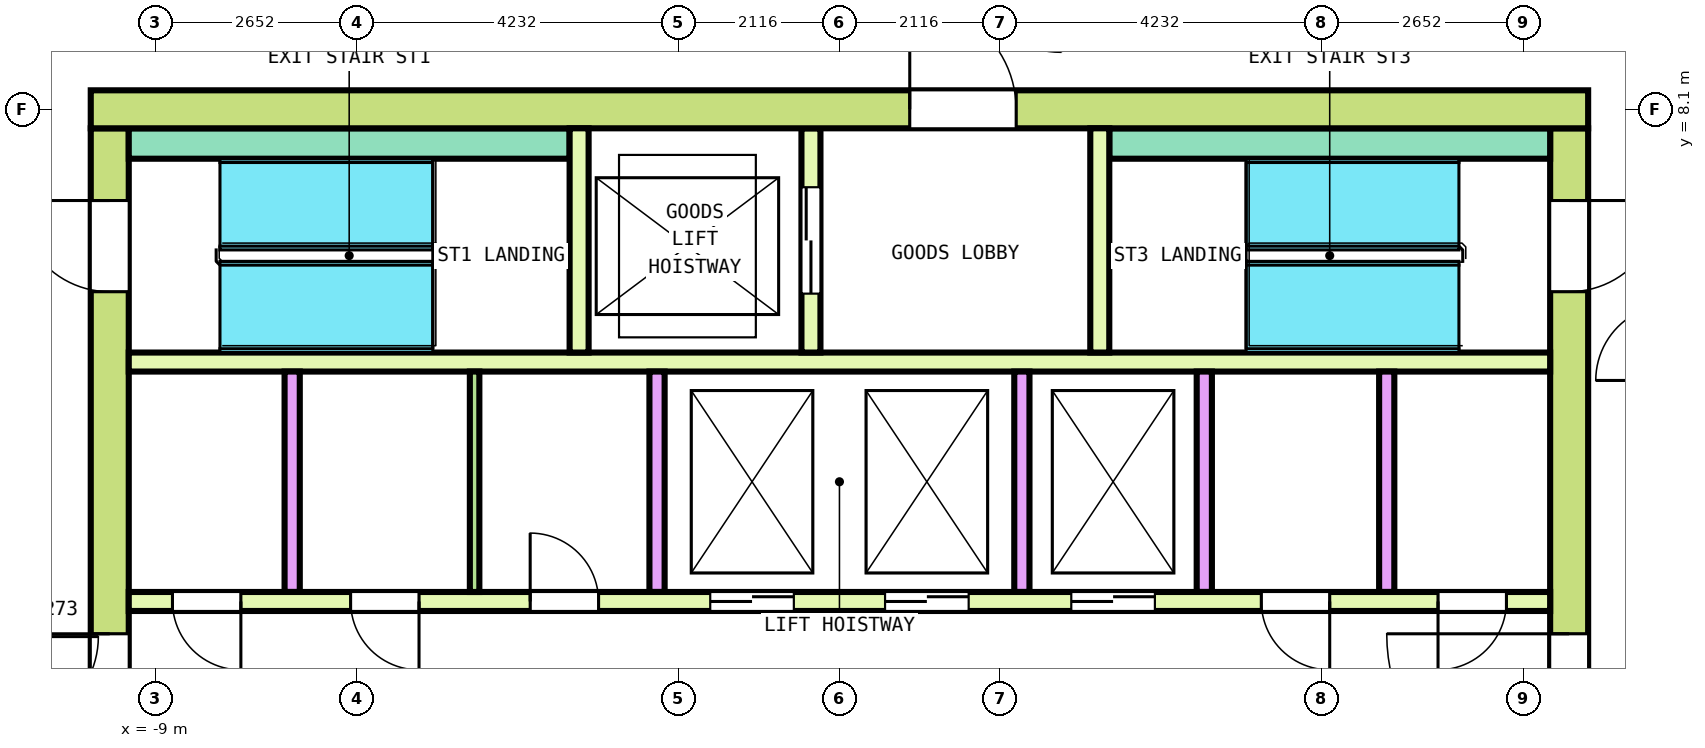
"""IFC4 building model, lengths in metres.
Left out: names, types, materials, properties, quantities, classifications, styles, units other than length and angle.
Written with IfcOpenShell. Run it as: python <this file> out.ifc"""

import sys

from ifc_helpers import new_model, si_unit, direction, frame, frame_2d, origin, place, context, subcontext, project, spatial, rectangle, extrude, element, fill, save


model = new_model("IFC4")
c1 = context("Model", 3, precision=1e-05, world=origin(), true_north=direction((0.0, 1.0)))
c2 = subcontext(c1, "Body", "Model", "MODEL_VIEW")
j1 = project(units=[si_unit("LENGTHUNIT", "METRE"), si_unit("PLANEANGLEUNIT", "RADIAN")], contexts=[c1])
p1 = place(None, origin())
s1 = spatial("IfcSite", under=j1, at=p1, CompositionType="ELEMENT")
p2 = place(p1, origin())
s2 = spatial("IfcBuilding", under=s1, at=p2, CompositionType="ELEMENT")
p3 = place(p2, frame((0.0, 0.0, 299.0)))
s3 = spatial("IfcBuildingStorey", under=s2, at=p3, CompositionType="ELEMENT", Elevation=299.0)
p4 = place(p3, frame((-9.85, 8.1, 0.0), z_axis=(0.0, 0.0, 1.0), x_axis=(1.0, 0.0, 0.0)))
e1 = element("IfcWall", 1, at=p4, inside=s3, PredefinedType="SHEAR", context=c2, shape_type="SweptSolid", body=[
    extrude(rectangle(XDim=19.7, YDim=0.5, at=frame_2d((9.85, 0.0))), origin(), (0.0, 0.0, 1.0), 3.7),
])
p5 = place(p4, frame((10.775, 0.0, 0.0)))
e2 = element("IfcOpeningElement", 2, at=p5, cuts=e1, PredefinedType="OPENING", context=c2, shape_type="SweptSolid", body=[
    extrude(rectangle(XDim=1.4, YDim=2.1, at=frame_2d((0.7, 1.05))), frame((0.0, 0.26, 0.0), z_axis=(0.0, -1.0, 0.0), x_axis=(1.0, 0.0, 0.0)), (0.0, 0.0, 1.0), 0.52),
])
p6 = place(p3, frame((-9.6, -7.85, 0.0), z_axis=(0.0, 0.0, 1.0), x_axis=(0.0, 1.0, 0.0)))
e3 = element("IfcWall", 3, at=p6, inside=s3, PredefinedType="SHEAR", context=c2, shape_type="SweptSolid", body=[
    extrude(rectangle(XDim=15.7, YDim=0.5, at=frame_2d((7.85, 0.0))), origin(), (0.0, 0.0, 1.0), 3.7),
])
p7 = place(p6, frame((6.65, 0.0, 0.0)))
e4 = element("IfcOpeningElement", 4, at=p7, cuts=e3, PredefinedType="OPENING", context=c2, shape_type="SweptSolid", body=[
    extrude(rectangle(XDim=2.4, YDim=2.1, at=frame_2d((1.2, 1.05))), frame((0.0, 0.26, 0.0), z_axis=(0.0, -1.0, 0.0), x_axis=(1.0, 0.0, 0.0)), (0.0, 0.0, 1.0), 0.52),
])
p8 = place(p6, frame((13.55, 0.0, 0.0)))
e5 = element("IfcOpeningElement", 5, at=p8, cuts=e3, PredefinedType="OPENING", context=c2, shape_type="SweptSolid", body=[
    extrude(rectangle(XDim=1.2, YDim=2.1, at=frame_2d((0.6, 1.05))), frame((0.0, 0.26, 0.0), z_axis=(0.0, -1.0, 0.0), x_axis=(1.0, 0.0, 0.0)), (0.0, 0.0, 1.0), 0.52),
])
p9 = place(p6, frame((0.95, 0.0, 0.0)))
e6 = element("IfcOpeningElement", 6, at=p9, cuts=e3, PredefinedType="OPENING", context=c2, shape_type="SweptSolid", body=[
    extrude(rectangle(XDim=1.2, YDim=2.1, at=frame_2d((0.6, 1.05))), frame((0.0, 0.26, 0.0), z_axis=(0.0, -1.0, 0.0), x_axis=(1.0, 0.0, 0.0)), (0.0, 0.0, 1.0), 0.52),
])
p10 = place(p3, frame((9.6, -7.85, 0.0), z_axis=(0.0, 0.0, 1.0), x_axis=(0.0, 1.0, 0.0)))
e7 = element("IfcWall", 7, at=p10, inside=s3, PredefinedType="SHEAR", context=c2, shape_type="SweptSolid", body=[
    extrude(rectangle(XDim=15.7, YDim=0.5, at=frame_2d((7.85, 0.0))), origin(), (0.0, 0.0, 1.0), 3.7),
])
p11 = place(p10, frame((6.65, 0.0, 0.0)))
e8 = element("IfcOpeningElement", 8, at=p11, cuts=e7, PredefinedType="OPENING", context=c2, shape_type="SweptSolid", body=[
    extrude(rectangle(XDim=2.4, YDim=2.1, at=frame_2d((1.2, 1.05))), frame((0.0, 0.26, 0.0), z_axis=(0.0, -1.0, 0.0), x_axis=(1.0, 0.0, 0.0)), (0.0, 0.0, 1.0), 0.52),
])
p12 = place(p10, frame((13.55, 0.0, 0.0)))
e9 = element("IfcOpeningElement", 9, at=p12, cuts=e7, PredefinedType="OPENING", context=c2, shape_type="SweptSolid", body=[
    extrude(rectangle(XDim=1.2, YDim=2.1, at=frame_2d((0.6, 1.05))), frame((0.0, 0.26, 0.0), z_axis=(0.0, -1.0, 0.0), x_axis=(1.0, 0.0, 0.0)), (0.0, 0.0, 1.0), 0.52),
])
p13 = place(p10, frame((1.05, 0.0, 0.0)))
e10 = element("IfcOpeningElement", 10, at=p13, cuts=e7, PredefinedType="OPENING", context=c2, shape_type="SweptSolid", body=[
    extrude(rectangle(XDim=1.0, YDim=2.1, at=frame_2d((0.5, 1.05))), frame((0.0, 0.26, 0.0), z_axis=(0.0, -1.0, 0.0), x_axis=(1.0, 0.0, 0.0)), (0.0, 0.0, 1.0), 0.52),
])
p14 = place(p3, frame((-9.35, 1.625, 0.0), z_axis=(0.0, 0.0, 1.0), x_axis=(1.0, 0.0, 0.0)))
e11 = element("IfcWall", 11, at=p14, inside=s3, PredefinedType="SOLIDWALL", context=c2, shape_type="SweptSolid", body=[
    extrude(rectangle(XDim=18.7, YDim=0.25, at=frame_2d((9.35, 0.0))), origin(), (0.0, 0.0, 1.0), 3.7),
])
p15 = place(p14, frame((7.65, 0.0, 0.0)))
e12 = element("IfcOpeningElement", 12, at=p15, cuts=e11, PredefinedType="OPENING", context=c2, shape_type="SweptSolid", body=[
    extrude(rectangle(XDim=1.1, YDim=2.1, at=frame_2d((0.55, 1.05))), frame((0.0, 0.135, 0.0), z_axis=(0.0, -1.0, 0.0), x_axis=(1.0, 0.0, 0.0)), (0.0, 0.0, 1.0), 0.27),
])
p16 = place(p14, frame((9.95, 0.0, 0.0)))
e13 = element("IfcOpeningElement", 13, at=p16, cuts=e11, PredefinedType="OPENING", context=c2, shape_type="SweptSolid", body=[
    extrude(rectangle(XDim=1.1, YDim=2.1, at=frame_2d((0.55, 1.05))), frame((0.0, 0.135, 0.0), z_axis=(0.0, -1.0, 0.0), x_axis=(1.0, 0.0, 0.0)), (0.0, 0.0, 1.0), 0.27),
])
p17 = place(p14, frame((12.4, 0.0, 0.0)))
e14 = element("IfcOpeningElement", 14, at=p17, cuts=e11, PredefinedType="OPENING", context=c2, shape_type="SweptSolid", body=[
    extrude(rectangle(XDim=1.1, YDim=2.1, at=frame_2d((0.55, 1.05))), frame((0.0, 0.135, 0.0), z_axis=(0.0, -1.0, 0.0), x_axis=(1.0, 0.0, 0.0)), (0.0, 0.0, 1.0), 0.27),
])
p18 = place(p14, frame((0.575, 0.0, 0.0)))
e15 = element("IfcOpeningElement", 15, at=p18, cuts=e11, PredefinedType="OPENING", context=c2, shape_type="SweptSolid", body=[
    extrude(rectangle(XDim=0.9, YDim=2.1, at=frame_2d((0.45, 1.05))), frame((0.0, 0.135, 0.0), z_axis=(0.0, -1.0, 0.0), x_axis=(1.0, 0.0, 0.0)), (0.0, 0.0, 1.0), 0.27),
])
p19 = place(p14, frame((2.919, 0.0, 0.0)))
e16 = element("IfcOpeningElement", 16, at=p19, cuts=e11, PredefinedType="OPENING", context=c2, shape_type="SweptSolid", body=[
    extrude(rectangle(XDim=0.9, YDim=2.1, at=frame_2d((0.45, 1.05))), frame((0.0, 0.135, 0.0), z_axis=(0.0, -1.0, 0.0), x_axis=(1.0, 0.0, 0.0)), (0.0, 0.0, 1.0), 0.27),
])
p20 = place(p14, frame((5.281, 0.0, 0.0)))
e17 = element("IfcOpeningElement", 17, at=p20, cuts=e11, PredefinedType="OPENING", context=c2, shape_type="SweptSolid", body=[
    extrude(rectangle(XDim=0.9, YDim=2.1, at=frame_2d((0.45, 1.05))), frame((0.0, 0.135, 0.0), z_axis=(0.0, -1.0, 0.0), x_axis=(1.0, 0.0, 0.0)), (0.0, 0.0, 1.0), 0.27),
])
p21 = place(p14, frame((14.9, 0.0, 0.0)))
e18 = element("IfcOpeningElement", 18, at=p21, cuts=e11, PredefinedType="OPENING", context=c2, shape_type="SweptSolid", body=[
    extrude(rectangle(XDim=0.9, YDim=2.1, at=frame_2d((0.45, 1.05))), frame((0.0, 0.135, 0.0), z_axis=(0.0, -1.0, 0.0), x_axis=(1.0, 0.0, 0.0)), (0.0, 0.0, 1.0), 0.27),
])
p22 = place(p14, frame((17.225, 0.0, 0.0)))
e19 = element("IfcOpeningElement", 19, at=p22, cuts=e11, PredefinedType="OPENING", context=c2, shape_type="SweptSolid", body=[
    extrude(rectangle(XDim=0.9, YDim=2.1, at=frame_2d((0.45, 1.05))), frame((0.0, 0.135, 0.0), z_axis=(0.0, -1.0, 0.0), x_axis=(1.0, 0.0, 0.0)), (0.0, 0.0, 1.0), 0.27),
])
p23 = place(p3, frame((-9.35, 4.775, 0.0), z_axis=(0.0, 0.0, 1.0), x_axis=(1.0, 0.0, 0.0)))
e20 = element("IfcWall", 20, at=p23, inside=s3, PredefinedType="SOLIDWALL", context=c2, shape_type="SweptSolid", body=[
    extrude(rectangle(XDim=18.7, YDim=0.25, at=frame_2d((9.35, 0.0))), origin(), (0.0, 0.0, 1.0), 3.7),
])
for number, where, z_axis, x_axis in (
    (21, (-7.2, 1.75, 0.0), (0.0, 0.0, 1.0), (0.0, 1.0, 0.0)),
    (22, (-2.4, 1.75, 0.0), (0.0, 0.0, 1.0), (0.0, 1.0, 0.0)),
    (23, (2.4, 1.75, 0.0), (0.0, 0.0, 1.0), (0.0, 1.0, 0.0)),
    (24, (4.8, 1.75, 0.0), (0.0, 0.0, 1.0), (0.0, 1.0, 0.0)),
    (25, (7.2, 1.75, 0.0), (0.0, 0.0, 1.0), (0.0, 1.0, 0.0)),
):
    element("IfcWall", number, at=place(p3, frame(where, z_axis=z_axis, x_axis=x_axis)), inside=s3, PredefinedType="SOLIDWALL", context=c2, shape_type="SweptSolid", body=[
        extrude(rectangle(XDim=2.9, YDim=0.2, at=frame_2d((1.45, 0.0))), origin(), (0.0, 0.0, 1.0), 3.7),
    ])
for number, where, z_axis, x_axis in (
    (26, (-9.35, 7.65, 0.0), (0.0, 0.0, 1.0), (1.0, 0.0, 0.0)),
    (27, (3.55, 7.65, 0.0), (0.0, 0.0, 1.0), (1.0, 0.0, 0.0)),
):
    element("IfcWall", number, at=place(p3, frame(where, z_axis=z_axis, x_axis=x_axis)), inside=s3, PredefinedType="SOLIDWALL", context=c2, shape_type="SweptSolid", body=[
        extrude(rectangle(XDim=5.8, YDim=0.4, at=frame_2d((2.9, 0.0))), origin(), (0.0, 0.0, 1.0), 3.7),
    ])
p24 = place(p3, frame((-3.425, 4.9, 0.0), z_axis=(0.0, 0.0, 1.0), x_axis=(0.0, 1.0, 0.0)))
e28 = element("IfcWall", 28, at=p24, inside=s3, PredefinedType="SOLIDWALL", context=c2, shape_type="SweptSolid", body=[
    extrude(rectangle(XDim=2.95, YDim=0.25, at=frame_2d((1.475, 0.0))), origin(), (0.0, 0.0, 1.0), 3.7),
])
p25 = place(p3, frame((-0.375, 4.9, 0.0), z_axis=(0.0, 0.0, 1.0), x_axis=(0.0, 1.0, 0.0)))
e29 = element("IfcWall", 29, at=p25, inside=s3, PredefinedType="SOLIDWALL", context=c2, shape_type="SweptSolid", body=[
    extrude(rectangle(XDim=2.95, YDim=0.25, at=frame_2d((1.475, 0.0))), origin(), (0.0, 0.0, 1.0), 3.7),
])
p26 = place(p25, frame((0.775, 0.0, 0.0)))
e30 = element("IfcOpeningElement", 30, at=p26, cuts=e29, PredefinedType="OPENING", context=c2, shape_type="SweptSolid", body=[
    extrude(rectangle(XDim=1.4, YDim=2.1, at=frame_2d((0.7, 1.05))), frame((0.0, 0.135, 0.0), z_axis=(0.0, -1.0, 0.0), x_axis=(1.0, 0.0, 0.0)), (0.0, 0.0, 1.0), 0.27),
])
p27 = place(p3, frame((3.425, 4.9, 0.0), z_axis=(0.0, 0.0, 1.0), x_axis=(0.0, 1.0, 0.0)))
e31 = element("IfcWall", 31, at=p27, inside=s3, PredefinedType="SOLIDWALL", context=c2, shape_type="SweptSolid", body=[
    extrude(rectangle(XDim=2.95, YDim=0.25, at=frame_2d((1.475, 0.0))), origin(), (0.0, 0.0, 1.0), 3.7),
])
p28 = place(p3, frame((-4.8, 1.75, 0.0), z_axis=(0.0, 0.0, 1.0), x_axis=(0.0, 1.0, 0.0)))
e32 = element("IfcWall", 32, at=p28, inside=s3, PredefinedType="PARTITIONING", context=c2, shape_type="SweptSolid", body=[
    extrude(rectangle(XDim=2.9, YDim=0.125, at=frame_2d((1.45, 0.0))), origin(), (0.0, 0.0, 1.0), 3.7),
])
p29 = place(p15, origin())
e33 = element("IfcDoor", 33, at=p29, inside=s3, OperationType="DOUBLE_DOOR_SLIDING", PredefinedType="DOOR", context=c2, shape_type="SweptSolid", body=[
    extrude(rectangle(XDim=1.1, YDim=2.1, at=frame_2d((0.55, 1.05))), frame((0.0, 0.075, 0.0), z_axis=(0.0, -1.0, 0.0), x_axis=(1.0, 0.0, 0.0)), (0.0, 0.0, 1.0), 0.15),
])
fill(e12, e33)
p30 = place(p16, origin())
e34 = element("IfcDoor", 34, at=p30, inside=s3, OperationType="DOUBLE_DOOR_SLIDING", PredefinedType="DOOR", context=c2, shape_type="SweptSolid", body=[
    extrude(rectangle(XDim=1.1, YDim=2.1, at=frame_2d((0.55, 1.05))), frame((0.0, 0.075, 0.0), z_axis=(0.0, -1.0, 0.0), x_axis=(1.0, 0.0, 0.0)), (0.0, 0.0, 1.0), 0.15),
])
fill(e13, e34)
p31 = place(p17, origin())
e35 = element("IfcDoor", 35, at=p31, inside=s3, OperationType="DOUBLE_DOOR_SLIDING", PredefinedType="DOOR", context=c2, shape_type="SweptSolid", body=[
    extrude(rectangle(XDim=1.1, YDim=2.1, at=frame_2d((0.55, 1.05))), frame((0.0, 0.075, 0.0), z_axis=(0.0, -1.0, 0.0), x_axis=(1.0, 0.0, 0.0)), (0.0, 0.0, 1.0), 0.15),
])
fill(e14, e35)
p32 = place(p26, origin())
e36 = element("IfcDoor", 36, at=p32, inside=s3, OperationType="DOUBLE_DOOR_SLIDING", PredefinedType="DOOR", context=c2, shape_type="SweptSolid", body=[
    extrude(rectangle(XDim=1.4, YDim=2.1, at=frame_2d((0.7, 1.05))), frame((0.0, 0.075, 0.0), z_axis=(0.0, -1.0, 0.0), x_axis=(1.0, 0.0, 0.0)), (0.0, 0.0, 1.0), 0.15),
])
fill(e30, e36)
p33 = place(p7, origin())
e37 = element("IfcDoor", 37, at=p33, inside=s3, OperationType="DOUBLE_DOOR_SINGLE_SWING", PredefinedType="DOOR", context=c2, shape_type="SweptSolid", body=[
    extrude(rectangle(XDim=2.4, YDim=2.1, at=frame_2d((1.2, 1.05))), frame((0.0, 0.2, 0.0), z_axis=(0.0, -1.0, 0.0), x_axis=(1.0, 0.0, 0.0)), (0.0, 0.0, 1.0), 0.4),
])
fill(e4, e37)
p34 = place(p11, origin())
e38 = element("IfcDoor", 38, at=p34, inside=s3, OperationType="DOUBLE_DOOR_SINGLE_SWING", PredefinedType="DOOR", context=c2, shape_type="SweptSolid", body=[
    extrude(rectangle(XDim=2.4, YDim=2.1, at=frame_2d((1.2, 1.05))), frame((0.0, 0.2, 0.0), z_axis=(0.0, -1.0, 0.0), x_axis=(1.0, 0.0, 0.0)), (0.0, 0.0, 1.0), 0.4),
])
fill(e8, e38)
p35 = place(p8, origin())
e39 = element("IfcDoor", 39, at=p35, inside=s3, OperationType="SINGLE_SWING_LEFT", PredefinedType="DOOR", context=c2, shape_type="SweptSolid", body=[
    extrude(rectangle(XDim=1.2, YDim=2.1, at=frame_2d((0.6, 1.05))), frame((0.0, 0.2, 0.0), z_axis=(0.0, -1.0, 0.0), x_axis=(1.0, 0.0, 0.0)), (0.0, 0.0, 1.0), 0.4),
])
fill(e5, e39)
p36 = place(p12, origin())
e40 = element("IfcDoor", 40, at=p36, inside=s3, OperationType="SINGLE_SWING_LEFT", PredefinedType="DOOR", context=c2, shape_type="SweptSolid", body=[
    extrude(rectangle(XDim=1.2, YDim=2.1, at=frame_2d((0.6, 1.05))), frame((0.0, 0.2, 0.0), z_axis=(0.0, -1.0, 0.0), x_axis=(1.0, 0.0, 0.0)), (0.0, 0.0, 1.0), 0.4),
])
fill(e9, e40)
p37 = place(p5, origin())
e41 = element("IfcDoor", 41, at=p37, inside=s3, OperationType="DOUBLE_DOOR_SINGLE_SWING", PredefinedType="DOOR", context=c2, shape_type="SweptSolid", body=[
    extrude(rectangle(XDim=1.4, YDim=2.1, at=frame_2d((0.7, 1.05))), frame((0.0, 0.2, 0.0), z_axis=(0.0, -1.0, 0.0), x_axis=(1.0, 0.0, 0.0)), (0.0, 0.0, 1.0), 0.4),
])
fill(e2, e41)
p38 = place(p18, origin())
e42 = element("IfcDoor", 42, at=p38, inside=s3, OperationType="SINGLE_SWING_LEFT", PredefinedType="DOOR", context=c2, shape_type="SweptSolid", body=[
    extrude(rectangle(XDim=0.9, YDim=2.1, at=frame_2d((0.45, 1.05))), frame((0.0, 0.075, 0.0), z_axis=(0.0, -1.0, 0.0), x_axis=(1.0, 0.0, 0.0)), (0.0, 0.0, 1.0), 0.15),
])
fill(e15, e42)
p39 = place(p19, origin())
e43 = element("IfcDoor", 43, at=p39, inside=s3, OperationType="SINGLE_SWING_RIGHT", PredefinedType="DOOR", context=c2, shape_type="SweptSolid", body=[
    extrude(rectangle(XDim=0.9, YDim=2.1, at=frame_2d((0.45, 1.05))), frame((0.0, 0.075, 0.0), z_axis=(0.0, -1.0, 0.0), x_axis=(1.0, 0.0, 0.0)), (0.0, 0.0, 1.0), 0.15),
])
fill(e16, e43)
p40 = place(p20, origin())
e44 = element("IfcDoor", 44, at=p40, inside=s3, OperationType="SINGLE_SWING_LEFT", PredefinedType="DOOR", context=c2, shape_type="SweptSolid", body=[
    extrude(rectangle(XDim=0.9, YDim=2.1, at=frame_2d((0.45, 1.05))), frame((0.0, 0.075, 0.0), z_axis=(0.0, -1.0, 0.0), x_axis=(1.0, 0.0, 0.0)), (0.0, 0.0, 1.0), 0.15),
])
fill(e17, e44)
p41 = place(p21, origin())
e45 = element("IfcDoor", 45, at=p41, inside=s3, OperationType="SINGLE_SWING_RIGHT", PredefinedType="DOOR", context=c2, shape_type="SweptSolid", body=[
    extrude(rectangle(XDim=0.9, YDim=2.1, at=frame_2d((0.45, 1.05))), frame((0.0, 0.075, 0.0), z_axis=(0.0, -1.0, 0.0), x_axis=(1.0, 0.0, 0.0)), (0.0, 0.0, 1.0), 0.15),
])
fill(e18, e45)
p42 = place(p22, origin())
e46 = element("IfcDoor", 46, at=p42, inside=s3, OperationType="SINGLE_SWING_LEFT", PredefinedType="DOOR", context=c2, shape_type="SweptSolid", body=[
    extrude(rectangle(XDim=0.9, YDim=2.1, at=frame_2d((0.45, 1.05))), frame((0.0, 0.075, 0.0), z_axis=(0.0, -1.0, 0.0), x_axis=(1.0, 0.0, 0.0)), (0.0, 0.0, 1.0), 0.15),
])
fill(e19, e46)
save(model, sys.argv[1])
